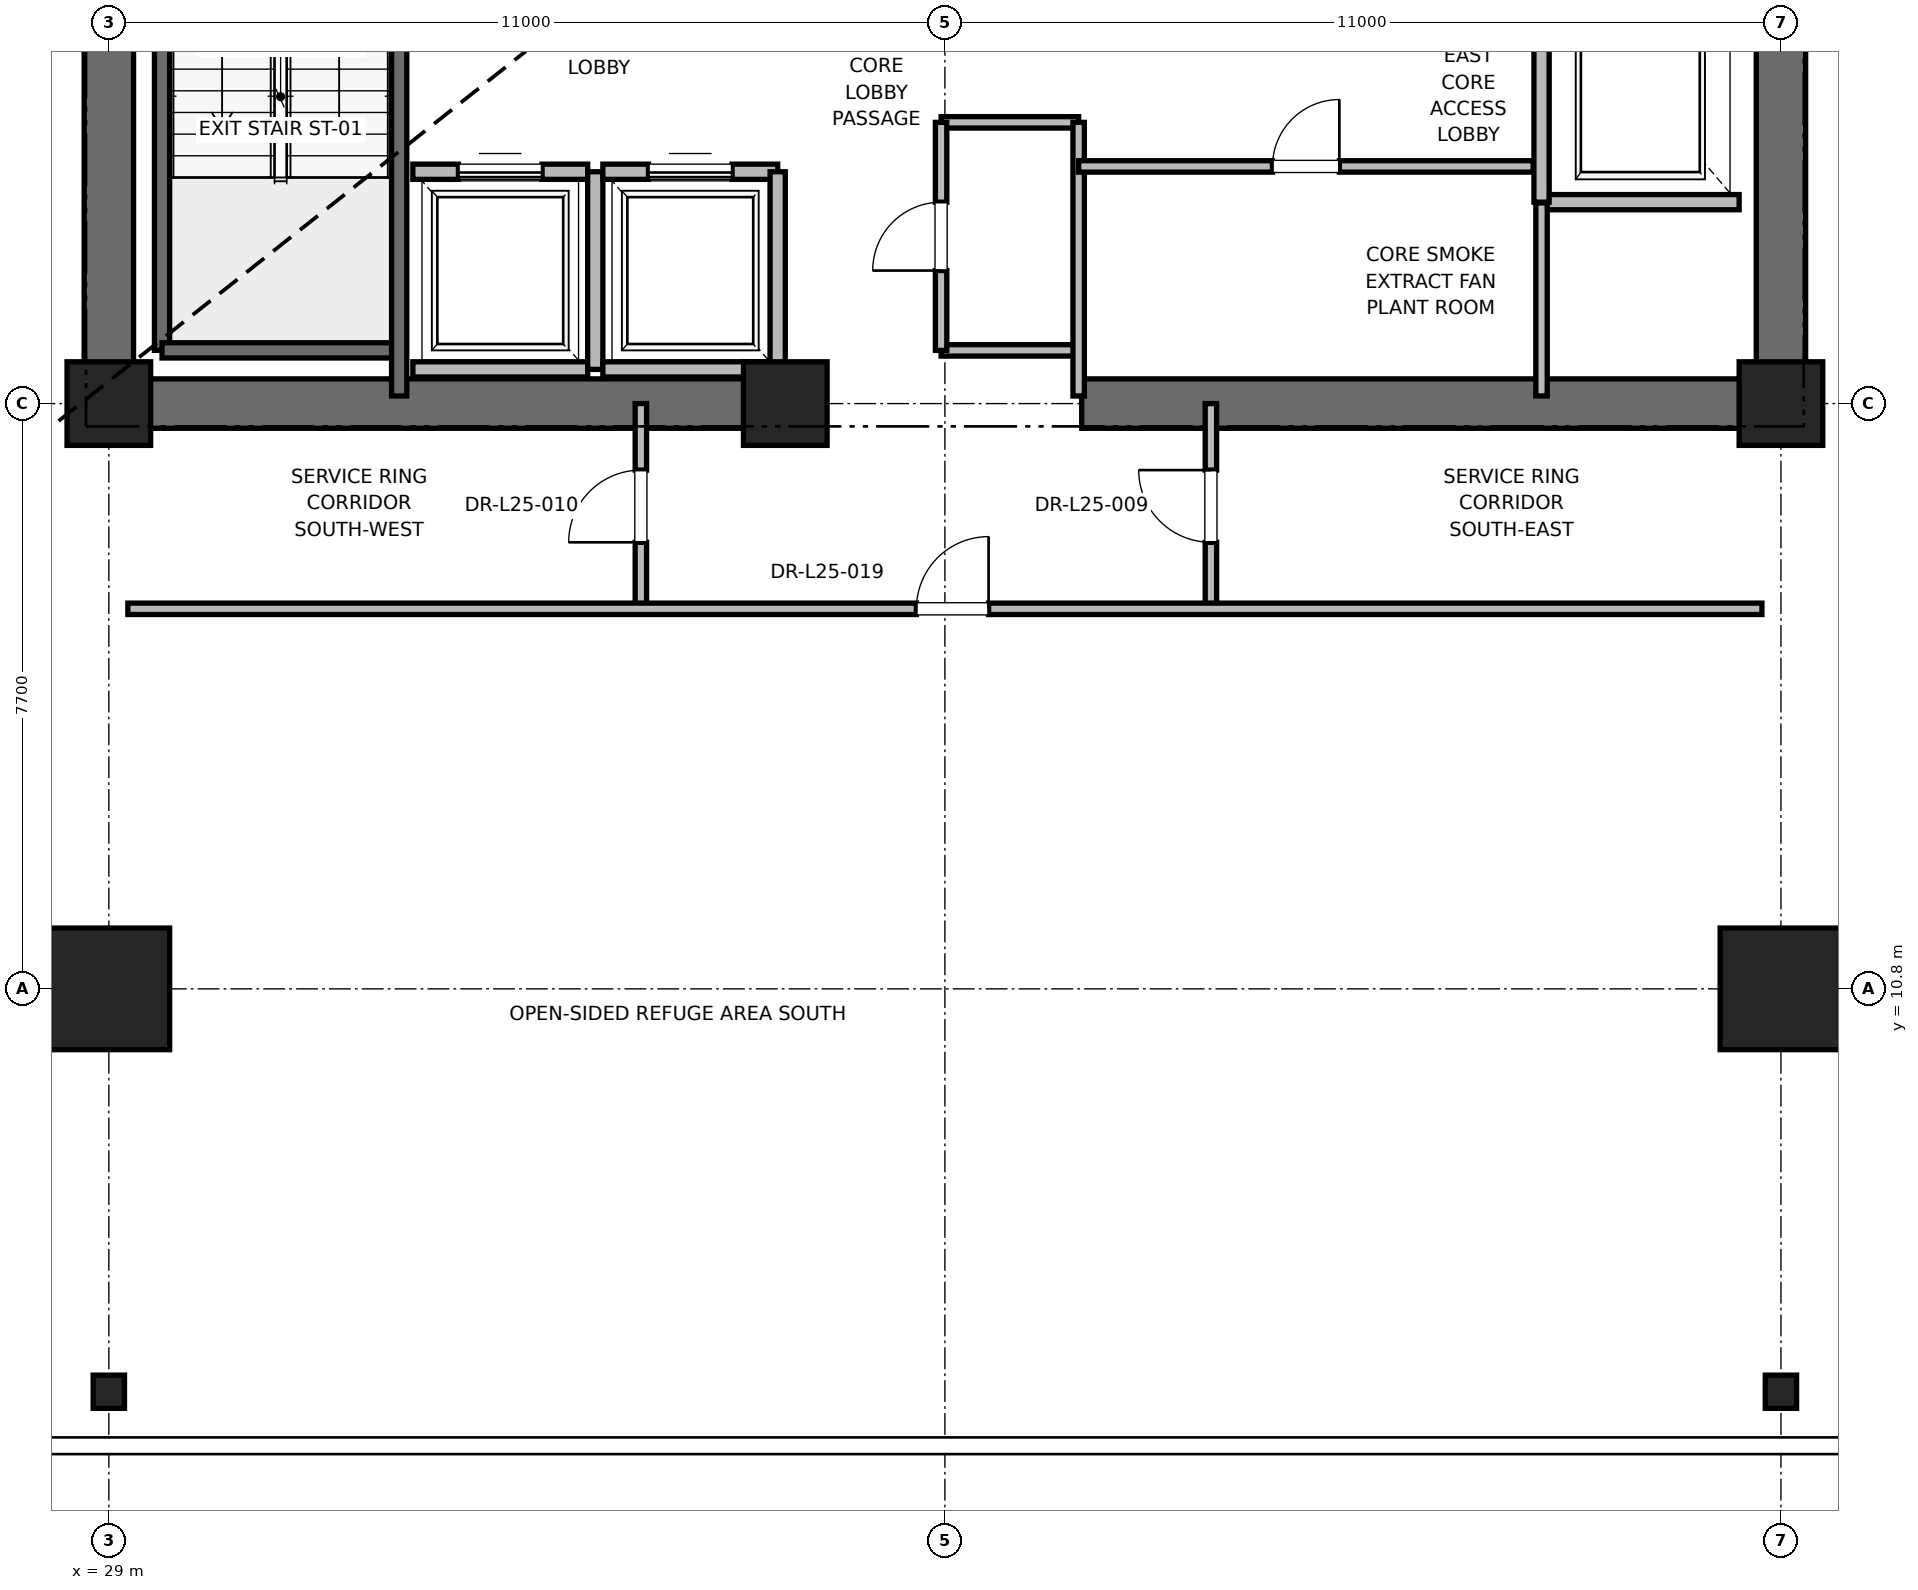
"""IFC4 building model, lengths in metres.
Left out: names, types, materials, properties, quantities, classifications, styles, units other than length and angle.
Written with IfcOpenShell. Run it as: python <this file> out.ifc"""

import sys

from ifc_helpers import new_model, si_unit, direction, frame, frame_2d, origin, origin_2d, place, context, subcontext, project, spatial, rectangle, i_section, extrude, element, fill, save


model = new_model("IFC4")
c1 = context("Model", 3, precision=1e-05, world=origin(), true_north=direction((0.0, 1.0)))
c2 = subcontext(c1, "Body", "Model", "MODEL_VIEW")
j1 = project(units=[si_unit("LENGTHUNIT", "METRE"), si_unit("PLANEANGLEUNIT", "RADIAN")], contexts=[c1])
p1 = place(None, origin())
s1 = spatial("IfcSite", under=j1, at=p1, CompositionType="ELEMENT")
p2 = place(p1, origin())
s2 = spatial("IfcBuilding", under=s1, at=p2, CompositionType="ELEMENT")
p3 = place(p2, frame((0.0, 0.0, 107.6)))
s3 = spatial("IfcBuildingStorey", under=s2, at=p3, CompositionType="ELEMENT", Elevation=107.6)
for number, where, z_axis, x_axis in (
    (1, (29.0, 10.8, 0.0), (0.0, 0.0, 1.0), (1.0, 0.0, 0.0)),
    (2, (51.0, 10.8, 0.0), (0.0, 0.0, 1.0), (1.0, 0.0, 0.0)),
):
    element("IfcColumn", number, at=place(p3, frame(where, z_axis=z_axis, x_axis=x_axis)), inside=s3, PredefinedType="COLUMN", context=c2, shape_type="SweptSolid", body=[
        extrude(rectangle(XDim=1.6, YDim=1.6, at=origin_2d()), origin(), (0.0, 0.0, 1.0), 5.4),
    ])
for number, where, z_axis, x_axis in (
    (3, (29.0, 5.5, 0.0), (0.0, 0.0, 1.0), (1.0, 0.0, 0.0)),
    (4, (51.0, 5.5, 0.0), (0.0, 0.0, 1.0), (1.0, 0.0, 0.0)),
):
    element("IfcColumn", number, at=place(p3, frame(where, z_axis=z_axis, x_axis=x_axis)), inside=s3, PredefinedType="COLUMN", context=c2, shape_type="SweptSolid", body=[
        extrude(i_section(OverallWidth=0.412, OverallDepth=0.437, WebThickness=0.036, FlangeThickness=0.058, FilletRadius=0.015, at=origin_2d()), origin(), (0.0, 0.0, 1.0), 5.4),
    ])
for number, where, z_axis, x_axis in (
    (5, (29.0, 18.5, 0.0), (0.0, 0.0, 1.0), (1.0, 0.0, 0.0)),
    (6, (51.0, 18.5, 0.0), (0.0, 0.0, 1.0), (1.0, 0.0, 0.0)),
    (7, (37.9, 18.5, 0.0), (0.0, 0.0, 1.0), (1.0, 0.0, 0.0)),
):
    element("IfcColumn", number, at=place(p3, frame(where, z_axis=z_axis, x_axis=x_axis)), inside=s3, PredefinedType="PILASTER", context=c2, shape_type="SweptSolid", body=[
        extrude(rectangle(XDim=1.1, YDim=1.1, at=origin_2d()), origin(), (0.0, 0.0, 1.0), 5.4),
    ])
for number, where, z_axis, x_axis in (
    (8, (29.0, 18.5, 0.0), (0.0, 0.0, 1.0), (1.0, 0.0, 0.0)),
    (9, (41.8, 18.5, 0.0), (0.0, 0.0, 1.0), (1.0, 0.0, 0.0)),
):
    element("IfcWall", number, at=place(p3, frame(where, z_axis=z_axis, x_axis=x_axis)), inside=s3, PredefinedType="SHEAR", context=c2, shape_type="SweptSolid", body=[
        extrude(rectangle(XDim=9.2, YDim=0.65, at=frame_2d((4.6, 0.0))), origin(), (0.0, 0.0, 1.0), 5.1),
    ])
p4 = place(p3, frame((29.0, 18.5, 0.0), z_axis=(0.0, 0.0, 1.0), x_axis=(0.0, 1.0, 0.0)))
e10 = element("IfcWall", 10, at=p4, inside=s3, PredefinedType="SHEAR", context=c2, shape_type="SweptSolid", body=[
    extrude(rectangle(XDim=8.8, YDim=0.65, at=frame_2d((4.4, 0.0))), origin(), (0.0, 0.0, 1.0), 5.1),
])
p5 = place(p3, frame((51.0, 18.5, 0.0), z_axis=(0.0, 0.0, 1.0), x_axis=(0.0, 1.0, 0.0)))
e11 = element("IfcWall", 11, at=p5, inside=s3, PredefinedType="SHEAR", context=c2, shape_type="SweptSolid", body=[
    extrude(rectangle(XDim=5.8, YDim=0.65, at=frame_2d((2.9, 0.0))), origin(), (0.0, 0.0, 1.0), 5.1),
])
p6 = place(p3, frame((29.7, 19.2, 0.0), z_axis=(0.0, 0.0, 1.0), x_axis=(0.0, 1.0, 0.0)))
e12 = element("IfcWall", 12, at=p6, inside=s3, PredefinedType="SOLIDWALL", context=c2, shape_type="SweptSolid", body=[
    extrude(rectangle(XDim=8.15, YDim=0.2, at=frame_2d((4.075, 0.0))), origin(), (0.0, 0.0, 1.0), 5.1),
])
p7 = place(p3, frame((29.7, 19.2, 0.0), z_axis=(0.0, 0.0, 1.0), x_axis=(1.0, 0.0, 0.0)))
e13 = element("IfcWall", 13, at=p7, inside=s3, PredefinedType="SOLIDWALL", context=c2, shape_type="SweptSolid", body=[
    extrude(rectangle(XDim=3.12, YDim=0.2, at=frame_2d((1.56, 0.0))), origin(), (0.0, 0.0, 1.0), 5.1),
])
p8 = place(p3, frame((32.82, 18.6, 0.0), z_axis=(0.0, 0.0, 1.0), x_axis=(0.0, 1.0, 0.0)))
e14 = element("IfcWall", 14, at=p8, inside=s3, PredefinedType="SOLIDWALL", context=c2, shape_type="SweptSolid", body=[
    extrude(rectangle(XDim=8.78, YDim=0.2, at=frame_2d((4.39, 0.0))), origin(), (0.0, 0.0, 1.0), 5.1),
])
p9 = place(p3, frame((47.85, 21.15, 0.0), z_axis=(0.0, 0.0, 1.0), x_axis=(1.0, 0.0, 0.0)))
e15 = element("IfcWall", 15, at=p9, inside=s3, PredefinedType="SOLIDWALL", context=c2, shape_type="SweptSolid", body=[
    extrude(rectangle(XDim=2.6, YDim=0.2, at=frame_2d((1.3, 0.0))), origin(), (0.0, 0.0, 1.0), 5.1),
])
p10 = place(p3, frame((47.85, 24.15, 0.0), z_axis=(0.0, 0.0, 1.0), x_axis=(0.0, -1.0, 0.0)))
e16 = element("IfcWall", 16, at=p10, inside=s3, PredefinedType="SOLIDWALL", context=c2, shape_type="SweptSolid", body=[
    extrude(rectangle(XDim=3.0, YDim=0.2, at=frame_2d((1.5, 0.0))), origin(), (0.0, 0.0, 1.0), 5.1),
])
p11 = place(p3, frame((33.0, 18.95, 0.0), z_axis=(0.0, 0.0, 1.0), x_axis=(1.0, 0.0, 0.0)))
e17 = element("IfcWall", 17, at=p11, inside=s3, PredefinedType="SOLIDWALL", context=c2, shape_type="SweptSolid", body=[
    extrude(rectangle(XDim=2.3, YDim=0.2, at=frame_2d((1.15, 0.0))), origin(), (0.0, 0.0, 1.0), 5.1),
])
p12 = place(p3, frame((35.3, 21.55, 0.0), z_axis=(0.0, 0.0, 1.0), x_axis=(-1.0, 0.0, 0.0)))
e18 = element("IfcWall", 18, at=p12, inside=s3, PredefinedType="SOLIDWALL", context=c2, shape_type="SweptSolid", body=[
    extrude(rectangle(XDim=2.3, YDim=0.2, at=frame_2d((1.15, 0.0))), origin(), (0.0, 0.0, 1.0), 5.1),
])
p13 = place(p12, frame((0.6, 0.0, 0.0)))
e19 = element("IfcOpeningElement", 19, at=p13, cuts=e18, PredefinedType="OPENING", context=c2, shape_type="SweptSolid", body=[
    extrude(rectangle(XDim=1.1, YDim=2.2, at=frame_2d((0.55, 1.1))), frame((0.0, 0.1, 0.0), z_axis=(0.0, -1.0, 0.0), x_axis=(1.0, 0.0, 0.0)), (0.0, 0.0, 1.0), 0.2),
])
p14 = place(p3, frame((35.4, 18.95, 0.0), z_axis=(0.0, 0.0, 1.0), x_axis=(0.0, 1.0, 0.0)))
e20 = element("IfcWall", 20, at=p14, inside=s3, PredefinedType="SOLIDWALL", context=c2, shape_type="SweptSolid", body=[
    extrude(rectangle(XDim=2.6, YDim=0.2, at=frame_2d((1.3, 0.0))), origin(), (0.0, 0.0, 1.0), 5.1),
])
p15 = place(p3, frame((35.5, 18.95, 0.0), z_axis=(0.0, 0.0, 1.0), x_axis=(1.0, 0.0, 0.0)))
e21 = element("IfcWall", 21, at=p15, inside=s3, PredefinedType="SOLIDWALL", context=c2, shape_type="SweptSolid", body=[
    extrude(rectangle(XDim=2.3, YDim=0.2, at=frame_2d((1.15, 0.0))), origin(), (0.0, 0.0, 1.0), 3.88),
])
p16 = place(p3, frame((37.8, 21.55, 0.0), z_axis=(0.0, 0.0, 1.0), x_axis=(-1.0, 0.0, 0.0)))
e22 = element("IfcWall", 22, at=p16, inside=s3, PredefinedType="SOLIDWALL", context=c2, shape_type="SweptSolid", body=[
    extrude(rectangle(XDim=2.3, YDim=0.2, at=frame_2d((1.15, 0.0))), origin(), (0.0, 0.0, 1.0), 5.1),
])
p17 = place(p16, frame((0.6, 0.0, 0.0)))
e23 = element("IfcOpeningElement", 23, at=p17, cuts=e22, PredefinedType="OPENING", context=c2, shape_type="SweptSolid", body=[
    extrude(rectangle(XDim=1.1, YDim=2.2, at=frame_2d((0.55, 1.1))), frame((0.0, 0.1, 0.0), z_axis=(0.0, -1.0, 0.0), x_axis=(1.0, 0.0, 0.0)), (0.0, 0.0, 1.0), 0.2),
])
p18 = place(p3, frame((37.8, 18.95, 0.0), z_axis=(0.0, 0.0, 1.0), x_axis=(0.0, 1.0, 0.0)))
e24 = element("IfcWall", 24, at=p18, inside=s3, PredefinedType="SOLIDWALL", context=c2, shape_type="SweptSolid", body=[
    extrude(rectangle(XDim=2.6, YDim=0.2, at=frame_2d((1.3, 0.0))), origin(), (0.0, 0.0, 1.0), 3.88),
])
for number, where, z_axis, x_axis in (
    (25, (39.95, 19.2, 0.0), (0.0, 0.0, 1.0), (1.0, 0.0, 0.0)),
    (26, (39.95, 22.2, 0.0), (0.0, 0.0, 1.0), (1.0, 0.0, 0.0)),
):
    element("IfcWall", number, at=place(p3, frame(where, z_axis=z_axis, x_axis=x_axis)), inside=s3, PredefinedType="PARTITIONING", context=c2, shape_type="SweptSolid", body=[
        extrude(rectangle(XDim=1.81, YDim=0.15, at=frame_2d((0.905, 0.0))), origin(), (0.0, 0.0, 1.0), 2.85),
    ])
p19 = place(p3, frame((41.76, 18.6, 0.0), z_axis=(0.0, 0.0, 1.0), x_axis=(0.0, 1.0, 0.0)))
e27 = element("IfcWall", 27, at=p19, inside=s3, PredefinedType="PARTITIONING", context=c2, shape_type="SweptSolid", body=[
    extrude(rectangle(XDim=3.6, YDim=0.15, at=frame_2d((1.8, 0.0))), origin(), (0.0, 0.0, 1.0), 2.85),
])
p20 = place(p3, frame((39.95, 19.2, 0.0), z_axis=(0.0, 0.0, 1.0), x_axis=(0.0, 1.0, 0.0)))
e28 = element("IfcWall", 28, at=p20, inside=s3, PredefinedType="PARTITIONING", context=c2, shape_type="SweptSolid", body=[
    extrude(rectangle(XDim=3.0, YDim=0.15, at=frame_2d((1.5, 0.0))), origin(), (0.0, 0.0, 1.0), 2.85),
])
p21 = place(p20, frame((1.05, 0.0, 0.0)))
e29 = element("IfcOpeningElement", 29, at=p21, cuts=e28, PredefinedType="OPENING", context=c2, shape_type="SweptSolid", body=[
    extrude(rectangle(XDim=0.9, YDim=2.1, at=frame_2d((0.45, 1.05))), frame((0.0, 0.075, 0.0), z_axis=(0.0, -1.0, 0.0), x_axis=(1.0, 0.0, 0.0)), (0.0, 0.0, 1.0), 0.15),
])
p22 = place(p3, frame((47.85, 18.6, 0.0), z_axis=(0.0, 0.0, 1.0), x_axis=(0.0, 1.0, 0.0)))
e30 = element("IfcWall", 30, at=p22, inside=s3, PredefinedType="PARTITIONING", context=c2, shape_type="SweptSolid", body=[
    extrude(rectangle(XDim=2.54, YDim=0.15, at=frame_2d((1.27, 0.0))), origin(), (0.0, 0.0, 1.0), 2.85),
])
p23 = place(p3, frame((41.76, 21.62, 0.0), z_axis=(0.0, 0.0, 1.0), x_axis=(1.0, 0.0, 0.0)))
e31 = element("IfcWall", 31, at=p23, inside=s3, PredefinedType="PARTITIONING", context=c2, shape_type="SweptSolid", body=[
    extrude(rectangle(XDim=5.98, YDim=0.15, at=frame_2d((2.99, 0.0))), origin(), (0.0, 0.0, 1.0), 2.85),
])
p24 = place(p23, frame((2.55, 0.0, 0.0)))
e32 = element("IfcOpeningElement", 32, at=p24, cuts=e31, PredefinedType="OPENING", context=c2, shape_type="SweptSolid", body=[
    extrude(rectangle(XDim=0.88, YDim=2.1, at=frame_2d((0.44, 1.05))), frame((0.0, 0.075, 0.0), z_axis=(0.0, -1.0, 0.0), x_axis=(1.0, 0.0, 0.0)), (0.0, 0.0, 1.0), 0.15),
])
p25 = place(p3, frame((36.0, 15.8, 0.0), z_axis=(0.0, 0.0, 1.0), x_axis=(0.0, 1.0, 0.0)))
e33 = element("IfcWall", 33, at=p25, inside=s3, PredefinedType="PARTITIONING", context=c2, shape_type="SweptSolid", body=[
    extrude(rectangle(XDim=2.7, YDim=0.15, at=frame_2d((1.35, 0.0))), origin(), (0.0, 0.0, 1.0), 2.85),
])
p26 = place(p25, frame((0.875, 0.0, 0.0)))
e34 = element("IfcOpeningElement", 34, at=p26, cuts=e33, PredefinedType="OPENING", context=c2, shape_type="SweptSolid", body=[
    extrude(rectangle(XDim=0.95, YDim=2.15, at=frame_2d((0.475, 1.075))), frame((0.0, 0.075, 0.0), z_axis=(0.0, -1.0, 0.0), x_axis=(1.0, 0.0, 0.0)), (0.0, 0.0, 1.0), 0.15),
])
p27 = place(p3, frame((43.5, 15.8, 0.0), z_axis=(0.0, 0.0, 1.0), x_axis=(0.0, 1.0, 0.0)))
e35 = element("IfcWall", 35, at=p27, inside=s3, PredefinedType="PARTITIONING", context=c2, shape_type="SweptSolid", body=[
    extrude(rectangle(XDim=2.7, YDim=0.15, at=frame_2d((1.35, 0.0))), origin(), (0.0, 0.0, 1.0), 2.85),
])
p28 = place(p27, frame((0.875, 0.0, 0.0)))
e36 = element("IfcOpeningElement", 36, at=p28, cuts=e35, PredefinedType="OPENING", context=c2, shape_type="SweptSolid", body=[
    extrude(rectangle(XDim=0.95, YDim=2.15, at=frame_2d((0.475, 1.075))), frame((0.0, 0.075, 0.0), z_axis=(0.0, -1.0, 0.0), x_axis=(1.0, 0.0, 0.0)), (0.0, 0.0, 1.0), 0.15),
])
p29 = place(p3, frame((29.25, 15.8, 0.0), z_axis=(0.0, 0.0, 1.0), x_axis=(1.0, 0.0, 0.0)))
e37 = element("IfcWall", 37, at=p29, inside=s3, PredefinedType="PARTITIONING", context=c2, shape_type="SweptSolid", body=[
    extrude(rectangle(XDim=21.5, YDim=0.15, at=frame_2d((10.75, 0.0))), origin(), (0.0, 0.0, 1.0), 2.85),
])
p30 = place(p29, frame((10.375, 0.0, 0.0)))
e38 = element("IfcOpeningElement", 38, at=p30, cuts=e37, PredefinedType="OPENING", context=c2, shape_type="SweptSolid", body=[
    extrude(rectangle(XDim=0.95, YDim=2.15, at=frame_2d((0.475, 1.075))), frame((0.0, 0.075, 0.0), z_axis=(0.0, -1.0, 0.0), x_axis=(1.0, 0.0, 0.0)), (0.0, 0.0, 1.0), 0.15),
])
p31 = place(p13, origin())
e39 = element("IfcDoor", 39, at=p31, inside=s3, OperationType="SLIDING_TO_RIGHT", PredefinedType="DOOR", context=c2, shape_type="SweptSolid", body=[
    extrude(rectangle(XDim=1.1, YDim=2.2, at=frame_2d((0.55, 1.1))), frame((0.0, 0.025, 0.0), z_axis=(0.0, -1.0, 0.0), x_axis=(1.0, 0.0, 0.0)), (0.0, 0.0, 1.0), 0.05),
])
fill(e19, e39)
p32 = place(p17, origin())
e40 = element("IfcDoor", 40, at=p32, inside=s3, OperationType="SLIDING_TO_RIGHT", PredefinedType="DOOR", context=c2, shape_type="SweptSolid", body=[
    extrude(rectangle(XDim=1.1, YDim=2.2, at=frame_2d((0.55, 1.1))), frame((0.0, 0.025, 0.0), z_axis=(0.0, -1.0, 0.0), x_axis=(1.0, 0.0, 0.0)), (0.0, 0.0, 1.0), 0.05),
])
fill(e23, e40)
p33 = place(p21, origin())
e41 = element("IfcDoor", 41, at=p33, inside=s3, OperationType="SINGLE_SWING_LEFT", PredefinedType="DOOR", context=c2, shape_type="SweptSolid", body=[
    extrude(rectangle(XDim=0.9, YDim=2.1, at=frame_2d((0.45, 1.05))), frame((0.0, 0.025, 0.0), z_axis=(0.0, -1.0, 0.0), x_axis=(1.0, 0.0, 0.0)), (0.0, 0.0, 1.0), 0.05),
])
fill(e29, e41)
p34 = place(p24, origin())
e42 = element("IfcDoor", 42, at=p34, inside=s3, OperationType="SINGLE_SWING_RIGHT", PredefinedType="DOOR", context=c2, shape_type="SweptSolid", body=[
    extrude(rectangle(XDim=0.88, YDim=2.1, at=frame_2d((0.44, 1.05))), frame((0.0, 0.025, 0.0), z_axis=(0.0, -1.0, 0.0), x_axis=(1.0, 0.0, 0.0)), (0.0, 0.0, 1.0), 0.05),
])
fill(e32, e42)
p35 = place(p26, origin())
e43 = element("IfcDoor", 43, at=p35, inside=s3, OperationType="SINGLE_SWING_LEFT", PredefinedType="DOOR", context=c2, shape_type="SweptSolid", body=[
    extrude(rectangle(XDim=0.95, YDim=2.15, at=frame_2d((0.475, 1.075))), frame((0.0, 0.025, 0.0), z_axis=(0.0, -1.0, 0.0), x_axis=(1.0, 0.0, 0.0)), (0.0, 0.0, 1.0), 0.05),
])
fill(e34, e43)
p36 = place(p28, origin())
e44 = element("IfcDoor", 44, at=p36, inside=s3, OperationType="SINGLE_SWING_RIGHT", PredefinedType="DOOR", context=c2, shape_type="SweptSolid", body=[
    extrude(rectangle(XDim=0.95, YDim=2.15, at=frame_2d((0.475, 1.075))), frame((0.0, 0.025, 0.0), z_axis=(0.0, -1.0, 0.0), x_axis=(1.0, 0.0, 0.0)), (0.0, 0.0, 1.0), 0.05),
])
fill(e36, e44)
p37 = place(p30, origin())
e45 = element("IfcDoor", 45, at=p37, inside=s3, OperationType="SINGLE_SWING_RIGHT", PredefinedType="DOOR", context=c2, shape_type="SweptSolid", body=[
    extrude(rectangle(XDim=0.95, YDim=2.15, at=frame_2d((0.475, 1.075))), frame((0.0, 0.025, 0.0), z_axis=(0.0, -1.0, 0.0), x_axis=(1.0, 0.0, 0.0)), (0.0, 0.0, 1.0), 0.05),
])
fill(e38, e45)
save(model, sys.argv[1])
